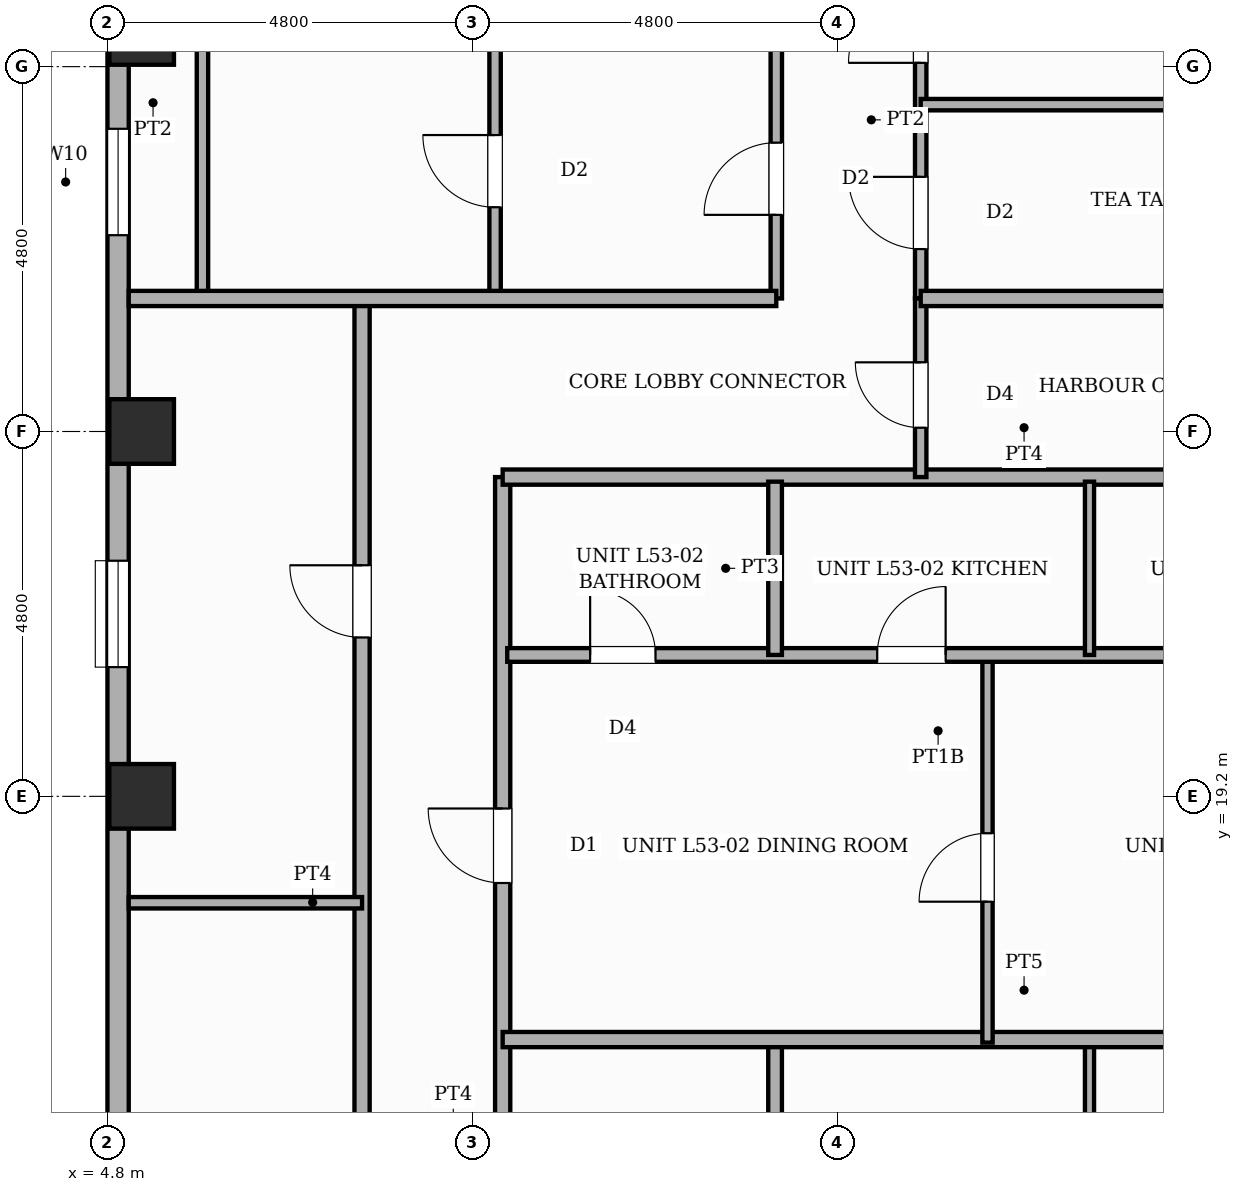
"""IFC4 building model, lengths in metres.
Left out: names, types, materials, properties, quantities, classifications, styles, units other than length and angle.
Written with IfcOpenShell. Run it as: python <this file> out.ifc"""

import sys

from ifc_helpers import new_model, si_unit, direction, frame, frame_2d, origin, origin_2d, place, context, subcontext, project, spatial, rectangle, extrude, element, fill, save


model = new_model("IFC4")
c1 = context("Model", 3, precision=1e-05, world=origin(), true_north=direction((0.0, 1.0)))
c2 = subcontext(c1, "Body", "Model", "MODEL_VIEW")
j1 = project(units=[si_unit("LENGTHUNIT", "METRE"), si_unit("PLANEANGLEUNIT", "RADIAN")], contexts=[c1])
p1 = place(None, origin())
s1 = spatial("IfcSite", under=j1, at=p1, CompositionType="ELEMENT")
p2 = place(p1, origin())
s2 = spatial("IfcBuilding", under=s1, at=p2, CompositionType="ELEMENT")
p3 = place(p2, frame((0.0, 0.0, 203.8)))
s3 = spatial("IfcBuildingStorey", under=s2, at=p3, CompositionType="ELEMENT", Elevation=203.8)
for number, where, z_axis, x_axis in (
    (1, (5.25, 19.2, 0.0), (0.0, 0.0, 1.0), (1.0, 0.0, 0.0)),
    (2, (5.25, 24.0, 0.0), (0.0, 0.0, 1.0), (1.0, 0.0, 0.0)),
    (3, (5.25, 29.25, 0.0), (0.0, 0.0, 1.0), (1.0, 0.0, 0.0)),
):
    element("IfcColumn", number, at=place(p3, frame(where, z_axis=z_axis, x_axis=x_axis)), inside=s3, PredefinedType="COLUMN", context=c2, shape_type="SweptSolid", body=[
        extrude(rectangle(XDim=0.85, YDim=0.85, at=origin_2d()), origin(), (0.0, 0.0, 1.0), 3.6),
    ])
p4 = place(p3, frame((4.94, 12.0, 0.0), z_axis=(0.0, 0.0, 1.0), x_axis=(0.0, 1.0, 0.0)))
e4 = element("IfcWall", 4, at=p4, inside=s3, PredefinedType="STANDARD", context=c2, shape_type="SweptSolid", body=[
    extrude(rectangle(XDim=33.6, YDim=0.28, at=frame_2d((16.8, 0.0))), origin(), (0.0, 0.0, 1.0), 2.66),
])
p5 = place(p4, frame((14.583, 0.0, 0.65)))
e5 = element("IfcOpeningElement", 5, at=p5, cuts=e4, PredefinedType="OPENING", context=c2, shape_type="SweptSolid", body=[
    extrude(rectangle(XDim=1.4, YDim=1.1, at=frame_2d((0.7, 0.55))), frame((0.0, 0.15, 0.0), z_axis=(0.0, -1.0, 0.0), x_axis=(1.0, 0.0, 0.0)), (0.0, 0.0, 1.0), 0.3),
])
p6 = place(p4, frame((0.308, 0.0, 0.65)))
e6 = element("IfcOpeningElement", 6, at=p6, cuts=e4, PredefinedType="OPENING", context=c2, shape_type="SweptSolid", body=[
    extrude(rectangle(XDim=1.4, YDim=1.1, at=frame_2d((0.7, 0.55))), frame((0.0, 0.15, 0.0), z_axis=(0.0, -1.0, 0.0), x_axis=(1.0, 0.0, 0.0)), (0.0, 0.0, 1.0), 0.3),
])
p7 = place(p4, frame((8.9, 0.0, 0.65)))
e7 = element("IfcOpeningElement", 7, at=p7, cuts=e4, PredefinedType="OPENING", context=c2, shape_type="SweptSolid", body=[
    extrude(rectangle(XDim=1.4, YDim=1.1, at=frame_2d((0.7, 0.55))), frame((0.0, 0.15, 0.0), z_axis=(0.0, -1.0, 0.0), x_axis=(1.0, 0.0, 0.0)), (0.0, 0.0, 1.0), 0.3),
])
p8 = place(p3, frame((13.6, 25.75, 0.0), z_axis=(0.0, 0.0, 1.0), x_axis=(0.0, 1.0, 0.0)))
e8 = element("IfcWall", 8, at=p8, inside=s3, PredefinedType="PARTITIONING", context=c2, shape_type="SweptSolid", body=[
    extrude(rectangle(XDim=5.15, YDim=0.15, at=frame_2d((2.575, 0.0))), origin(), (0.0, 0.0, 1.0), 3.38),
])
p9 = place(p8, frame((1.1, 0.0, 0.0)))
e9 = element("IfcOpeningElement", 9, at=p9, cuts=e8, PredefinedType="OPENING", context=c2, shape_type="SweptSolid", body=[
    extrude(rectangle(XDim=0.95, YDim=2.15, at=frame_2d((0.475, 1.075))), frame((0.0, 0.085, 0.0), z_axis=(0.0, -1.0, 0.0), x_axis=(1.0, 0.0, 0.0)), (0.0, 0.0, 1.0), 0.17),
])
p10 = place(p3, frame((15.5, 25.75, 0.0), z_axis=(0.0, 0.0, 1.0), x_axis=(0.0, 1.0, 0.0)))
e10 = element("IfcWall", 10, at=p10, inside=s3, PredefinedType="PARTITIONING", context=c2, shape_type="SweptSolid", body=[
    extrude(rectangle(XDim=5.15, YDim=0.15, at=frame_2d((2.575, 0.0))), origin(), (0.0, 0.0, 1.0), 3.38),
])
p11 = place(p10, frame((0.65, 0.0, 0.0)))
e11 = element("IfcOpeningElement", 11, at=p11, cuts=e10, PredefinedType="OPENING", context=c2, shape_type="SweptSolid", body=[
    extrude(rectangle(XDim=0.95, YDim=2.15, at=frame_2d((0.475, 1.075))), frame((0.0, 0.085, 0.0), z_axis=(0.0, -1.0, 0.0), x_axis=(1.0, 0.0, 0.0)), (0.0, 0.0, 1.0), 0.17),
])
p12 = place(p10, frame((3.1, 0.0, 0.0)))
e12 = element("IfcOpeningElement", 12, at=p12, cuts=e10, PredefinedType="OPENING", context=c2, shape_type="SweptSolid", body=[
    extrude(rectangle(XDim=0.95, YDim=2.15, at=frame_2d((0.475, 1.075))), frame((0.0, 0.085, 0.0), z_axis=(0.0, -1.0, 0.0), x_axis=(1.0, 0.0, 0.0)), (0.0, 0.0, 1.0), 0.17),
])
p13 = place(p3, frame((6.05, 25.75, 0.0), z_axis=(0.0, 0.0, 1.0), x_axis=(0.0, 1.0, 0.0)))
e13 = element("IfcWall", 13, at=p13, inside=s3, PredefinedType="PARTITIONING", context=c2, shape_type="SweptSolid", body=[
    extrude(rectangle(XDim=5.15, YDim=0.15, at=frame_2d((2.575, 0.0))), origin(), (0.0, 0.0, 1.0), 3.38),
])
p14 = place(p3, frame((9.9, 25.75, 0.0), z_axis=(0.0, 0.0, 1.0), x_axis=(0.0, 1.0, 0.0)))
e14 = element("IfcWall", 14, at=p14, inside=s3, PredefinedType="PARTITIONING", context=c2, shape_type="SweptSolid", body=[
    extrude(rectangle(XDim=5.15, YDim=0.15, at=frame_2d((2.575, 0.0))), origin(), (0.0, 0.0, 1.0), 3.38),
])
p15 = place(p14, frame((1.2, 0.0, 0.0)))
e15 = element("IfcOpeningElement", 15, at=p15, cuts=e14, PredefinedType="OPENING", context=c2, shape_type="SweptSolid", body=[
    extrude(rectangle(XDim=0.95, YDim=2.15, at=frame_2d((0.475, 1.075))), frame((0.0, 0.085, 0.0), z_axis=(0.0, -1.0, 0.0), x_axis=(1.0, 0.0, 0.0)), (0.0, 0.0, 1.0), 0.17),
])
p16 = place(p3, frame((15.5, 28.3, 0.0), z_axis=(0.0, 0.0, 1.0), x_axis=(1.0, 0.0, 0.0)))
e16 = element("IfcWall", 16, at=p16, inside=s3, PredefinedType="PARTITIONING", context=c2, shape_type="SweptSolid", body=[
    extrude(rectangle(XDim=7.25, YDim=0.15, at=frame_2d((3.625, 0.0))), origin(), (0.0, 0.0, 1.0), 3.38),
])
p17 = place(p3, frame((8.15, 9.88, 0.0), z_axis=(0.0, 0.0, 1.0), x_axis=(0.0, 1.0, 0.0)))
e17 = element("IfcWall", 17, at=p17, inside=s3, PredefinedType="PARTITIONING", context=c2, shape_type="SweptSolid", body=[
    extrude(rectangle(XDim=15.87, YDim=0.2, at=frame_2d((7.935, 0.0))), origin(), (0.0, 0.0, 1.0), 3.38),
])
p18 = place(p17, frame((3.49, 0.0, 0.0)))
e18 = element("IfcOpeningElement", 18, at=p18, cuts=e17, PredefinedType="OPENING", context=c2, shape_type="SweptSolid", body=[
    extrude(rectangle(XDim=0.95, YDim=2.15, at=frame_2d((0.475, 1.075))), frame((0.0, 0.11, 0.0), z_axis=(0.0, -1.0, 0.0), x_axis=(1.0, 0.0, 0.0)), (0.0, 0.0, 1.0), 0.22),
])
p19 = place(p17, frame((11.41, 0.0, 0.0)))
e19 = element("IfcOpeningElement", 19, at=p19, cuts=e17, PredefinedType="OPENING", context=c2, shape_type="SweptSolid", body=[
    extrude(rectangle(XDim=0.95, YDim=2.15, at=frame_2d((0.475, 1.075))), frame((0.0, 0.11, 0.0), z_axis=(0.0, -1.0, 0.0), x_axis=(1.0, 0.0, 0.0)), (0.0, 0.0, 1.0), 0.22),
])
p20 = place(p3, frame((10.0, 9.88, 0.0), z_axis=(0.0, 0.0, 1.0), x_axis=(0.0, 1.0, 0.0)))
e20 = element("IfcWall", 20, at=p20, inside=s3, PredefinedType="PARTITIONING", context=c2, shape_type="SweptSolid", body=[
    extrude(rectangle(XDim=13.52, YDim=0.2, at=frame_2d((6.76, 0.0))), origin(), (0.0, 0.0, 1.0), 3.38),
])
p21 = place(p20, frame((0.894, 0.0, 0.0)))
e21 = element("IfcOpeningElement", 21, at=p21, cuts=e20, PredefinedType="OPENING", context=c2, shape_type="SweptSolid", body=[
    extrude(rectangle(XDim=0.98, YDim=2.18, at=frame_2d((0.49, 1.09))), frame((0.0, 0.11, 0.0), z_axis=(0.0, -1.0, 0.0), x_axis=(1.0, 0.0, 0.0)), (0.0, 0.0, 1.0), 0.22),
])
p22 = place(p20, frame((8.18, 0.0, 0.0)))
e22 = element("IfcOpeningElement", 22, at=p22, cuts=e20, PredefinedType="OPENING", context=c2, shape_type="SweptSolid", body=[
    extrude(rectangle(XDim=0.98, YDim=2.18, at=frame_2d((0.49, 1.09))), frame((0.0, 0.11, 0.0), z_axis=(0.0, -1.0, 0.0), x_axis=(1.0, 0.0, 0.0)), (0.0, 0.0, 1.0), 0.22),
])
p23 = place(p3, frame((10.0, 23.4, 0.0), z_axis=(0.0, 0.0, 1.0), x_axis=(1.0, 0.0, 0.0)))
e23 = element("IfcWall", 23, at=p23, inside=s3, PredefinedType="PARTITIONING", context=c2, shape_type="SweptSolid", body=[
    extrude(rectangle(XDim=13.72, YDim=0.2, at=frame_2d((6.86, 0.0))), origin(), (0.0, 0.0, 1.0), 3.38),
])
p24 = place(p3, frame((5.08, 25.75, 0.0), z_axis=(0.0, 0.0, 1.0), x_axis=(1.0, 0.0, 0.0)))
e24 = element("IfcWall", 24, at=p24, inside=s3, PredefinedType="PARTITIONING", context=c2, shape_type="SweptSolid", body=[
    extrude(rectangle(XDim=8.52, YDim=0.2, at=frame_2d((4.26, 0.0))), origin(), (0.0, 0.0, 1.0), 3.38),
])
p25 = place(p3, frame((15.5, 23.4, 0.0), z_axis=(0.0, 0.0, 1.0), x_axis=(0.0, 1.0, 0.0)))
e25 = element("IfcWall", 25, at=p25, inside=s3, PredefinedType="PARTITIONING", context=c2, shape_type="SweptSolid", body=[
    extrude(rectangle(XDim=2.35, YDim=0.15, at=frame_2d((1.175, 0.0))), origin(), (0.0, 0.0, 1.0), 3.38),
])
p26 = place(p25, frame((0.65, 0.0, 0.0)))
e26 = element("IfcOpeningElement", 26, at=p26, cuts=e25, PredefinedType="OPENING", context=c2, shape_type="SweptSolid", body=[
    extrude(rectangle(XDim=0.86, YDim=2.1, at=frame_2d((0.43, 1.05))), frame((0.0, 0.085, 0.0), z_axis=(0.0, -1.0, 0.0), x_axis=(1.0, 0.0, 0.0)), (0.0, 0.0, 1.0), 0.17),
])
p27 = place(p3, frame((15.5, 25.75, 0.0), z_axis=(0.0, 0.0, 1.0), x_axis=(1.0, 0.0, 0.0)))
e27 = element("IfcWall", 27, at=p27, inside=s3, PredefinedType="PARTITIONING", context=c2, shape_type="SweptSolid", body=[
    extrude(rectangle(XDim=8.22, YDim=0.2, at=frame_2d((4.11, 0.0))), origin(), (0.0, 0.0, 1.0), 3.38),
])
p28 = place(p3, frame((5.08, 17.8, 0.0), z_axis=(0.0, 0.0, 1.0), x_axis=(1.0, 0.0, 0.0)))
e28 = element("IfcWall", 28, at=p28, inside=s3, PredefinedType="PARTITIONING", context=c2, shape_type="SweptSolid", body=[
    extrude(rectangle(XDim=3.07, YDim=0.15, at=frame_2d((1.535, 0.0))), origin(), (0.0, 0.0, 1.0), 3.38),
])
p29 = place(p3, frame((13.584, 12.348, 0.0), z_axis=(0.0, 0.0, 1.0), x_axis=(0.0, 1.0, 0.0)))
e29 = element("IfcWall", 29, at=p29, inside=s3, PredefinedType="PLUMBINGWALL", context=c2, shape_type="SweptSolid", body=[
    extrude(rectangle(XDim=3.692, YDim=0.18, at=frame_2d((1.846, 0.0))), origin(), (0.0, 0.0, 1.0), 3.38),
])
p30 = place(p3, frame((17.721, 12.348, 0.0), z_axis=(0.0, 0.0, 1.0), x_axis=(0.0, 1.0, 0.0)))
e30 = element("IfcWall", 30, at=p30, inside=s3, PredefinedType="PARTITIONING", context=c2, shape_type="SweptSolid", body=[
    extrude(rectangle(XDim=3.692, YDim=0.12, at=frame_2d((1.846, 0.0))), origin(), (0.0, 0.0, 1.0), 3.38),
])
p31 = place(p3, frame((10.0, 16.0, 0.0), z_axis=(0.0, 0.0, 1.0), x_axis=(1.0, 0.0, 0.0)))
e31 = element("IfcWall", 31, at=p31, inside=s3, PredefinedType="SOLIDWALL", context=c2, shape_type="SweptSolid", body=[
    extrude(rectangle(XDim=13.72, YDim=0.2, at=frame_2d((6.86, 0.0))), origin(), (0.0, 0.0, 1.0), 3.38),
])
p32 = place(p3, frame((16.379, 15.96, 0.0), z_axis=(0.0, 0.0, 1.0), x_axis=(0.0, 1.0, 0.0)))
e32 = element("IfcWall", 32, at=p32, inside=s3, PredefinedType="PARTITIONING", context=c2, shape_type="SweptSolid", body=[
    extrude(rectangle(XDim=5.1, YDim=0.135, at=frame_2d((2.55, 0.0))), origin(), (0.0, 0.0, 1.0), 3.38),
])
p33 = place(p32, frame((1.854, 0.0, 0.0)))
e33 = element("IfcOpeningElement", 33, at=p33, cuts=e32, PredefinedType="OPENING", context=c2, shape_type="SweptSolid", body=[
    extrude(rectangle(XDim=0.9, YDim=2.15, at=frame_2d((0.45, 1.075))), frame((0.0, 0.078, 0.0), z_axis=(0.0, -1.0, 0.0), x_axis=(1.0, 0.0, 0.0)), (0.0, 0.0, 1.0), 0.155),
])
p34 = place(p3, frame((10.06, 21.06, 0.0), z_axis=(0.0, 0.0, 1.0), x_axis=(1.0, 0.0, 0.0)))
e34 = element("IfcWall", 34, at=p34, inside=s3, PredefinedType="PLUMBINGWALL", context=c2, shape_type="SweptSolid", body=[
    extrude(rectangle(XDim=13.66, YDim=0.18, at=frame_2d((6.83, 0.0))), origin(), (0.0, 0.0, 1.0), 3.38),
])
p35 = place(p34, frame((1.091, 0.0, 0.0)))
e35 = element("IfcOpeningElement", 35, at=p35, cuts=e34, PredefinedType="OPENING", context=c2, shape_type="SweptSolid", body=[
    extrude(rectangle(XDim=0.86, YDim=2.1, at=frame_2d((0.43, 1.05))), frame((0.0, 0.1, 0.0), z_axis=(0.0, -1.0, 0.0), x_axis=(1.0, 0.0, 0.0)), (0.0, 0.0, 1.0), 0.2),
])
p36 = place(p34, frame((4.868, 0.0, 0.0)))
e36 = element("IfcOpeningElement", 36, at=p36, cuts=e34, PredefinedType="OPENING", context=c2, shape_type="SweptSolid", body=[
    extrude(rectangle(XDim=0.9, YDim=2.15, at=frame_2d((0.45, 1.075))), frame((0.0, 0.1, 0.0), z_axis=(0.0, -1.0, 0.0), x_axis=(1.0, 0.0, 0.0)), (0.0, 0.0, 1.0), 0.2),
])
p37 = place(p34, frame((9.897, 0.0, 0.0)))
e37 = element("IfcOpeningElement", 37, at=p37, cuts=e34, PredefinedType="OPENING", context=c2, shape_type="SweptSolid", body=[
    extrude(rectangle(XDim=0.9, YDim=2.15, at=frame_2d((0.45, 1.075))), frame((0.0, 0.1, 0.0), z_axis=(0.0, -1.0, 0.0), x_axis=(1.0, 0.0, 0.0)), (0.0, 0.0, 1.0), 0.2),
])
p38 = place(p3, frame((13.584, 21.06, 0.0), z_axis=(0.0, 0.0, 1.0), x_axis=(0.0, 1.0, 0.0)))
e38 = element("IfcWall", 38, at=p38, inside=s3, PredefinedType="PLUMBINGWALL", context=c2, shape_type="SweptSolid", body=[
    extrude(rectangle(XDim=2.28, YDim=0.18, at=frame_2d((1.14, 0.0))), origin(), (0.0, 0.0, 1.0), 3.38),
])
p39 = place(p3, frame((17.721, 21.06, 0.0), z_axis=(0.0, 0.0, 1.0), x_axis=(0.0, 1.0, 0.0)))
e39 = element("IfcWall", 39, at=p39, inside=s3, PredefinedType="PARTITIONING", context=c2, shape_type="SweptSolid", body=[
    extrude(rectangle(XDim=2.28, YDim=0.12, at=frame_2d((1.14, 0.0))), origin(), (0.0, 0.0, 1.0), 3.38),
])
p40 = place(p5, origin())
e40 = element("IfcWindow", 40, at=p40, inside=s3, PartitioningType="SINGLE_PANEL", PredefinedType="WINDOW", context=c2, shape_type="SweptSolid", body=[
    extrude(rectangle(XDim=1.4, YDim=1.1, at=frame_2d((0.7, 0.55))), frame((0.0, 0.03, 0.0), z_axis=(0.0, -1.0, 0.0), x_axis=(1.0, 0.0, 0.0)), (0.0, 0.0, 1.0), 0.06),
])
fill(e5, e40)
p41 = place(p7, origin())
e41 = element("IfcWindow", 41, at=p41, inside=s3, PartitioningType="SINGLE_PANEL", PredefinedType="WINDOW", context=c2, shape_type="SweptSolid", body=[
    extrude(rectangle(XDim=1.4, YDim=1.1, at=frame_2d((0.7, 0.55))), frame((0.0, 0.03, 0.0), z_axis=(0.0, -1.0, 0.0), x_axis=(1.0, 0.0, 0.0)), (0.0, 0.0, 1.0), 0.06),
])
fill(e7, e41)
p42 = place(p9, origin())
e42 = element("IfcDoor", 42, at=p42, inside=s3, OperationType="SINGLE_SWING_LEFT", PredefinedType="DOOR", context=c2, shape_type="SweptSolid", body=[
    extrude(rectangle(XDim=0.95, YDim=2.15, at=frame_2d((0.475, 1.075))), frame((0.0, 0.025, 0.0), z_axis=(0.0, -1.0, 0.0), x_axis=(1.0, 0.0, 0.0)), (0.0, 0.0, 1.0), 0.05),
])
fill(e9, e42)
p43 = place(p15, origin())
e43 = element("IfcDoor", 43, at=p43, inside=s3, OperationType="SINGLE_SWING_RIGHT", PredefinedType="DOOR", context=c2, shape_type="SweptSolid", body=[
    extrude(rectangle(XDim=0.95, YDim=2.15, at=frame_2d((0.475, 1.075))), frame((0.0, 0.025, 0.0), z_axis=(0.0, -1.0, 0.0), x_axis=(1.0, 0.0, 0.0)), (0.0, 0.0, 1.0), 0.05),
])
fill(e15, e43)
p44 = place(p11, origin())
e44 = element("IfcDoor", 44, at=p44, inside=s3, OperationType="SINGLE_SWING_RIGHT", PredefinedType="DOOR", context=c2, shape_type="SweptSolid", body=[
    extrude(rectangle(XDim=0.95, YDim=2.15, at=frame_2d((0.475, 1.075))), frame((0.0, 0.025, 0.0), z_axis=(0.0, -1.0, 0.0), x_axis=(1.0, 0.0, 0.0)), (0.0, 0.0, 1.0), 0.05),
])
fill(e11, e44)
p45 = place(p12, origin())
e45 = element("IfcDoor", 45, at=p45, inside=s3, OperationType="SINGLE_SWING_LEFT", PredefinedType="DOOR", context=c2, shape_type="SweptSolid", body=[
    extrude(rectangle(XDim=0.95, YDim=2.15, at=frame_2d((0.475, 1.075))), frame((0.0, 0.025, 0.0), z_axis=(0.0, -1.0, 0.0), x_axis=(1.0, 0.0, 0.0)), (0.0, 0.0, 1.0), 0.05),
])
fill(e12, e45)
p46 = place(p26, origin())
e46 = element("IfcDoor", 46, at=p46, inside=s3, OperationType="SINGLE_SWING_RIGHT", PredefinedType="DOOR", context=c2, shape_type="SweptSolid", body=[
    extrude(rectangle(XDim=0.86, YDim=2.1, at=frame_2d((0.43, 1.05))), frame((0.0, 0.025, 0.0), z_axis=(0.0, -1.0, 0.0), x_axis=(1.0, 0.0, 0.0)), (0.0, 0.0, 1.0), 0.05),
])
fill(e26, e46)
p47 = place(p19, origin())
e47 = element("IfcDoor", 47, at=p47, inside=s3, OperationType="SINGLE_SWING_RIGHT", PredefinedType="DOOR", context=c2, shape_type="SweptSolid", body=[
    extrude(rectangle(XDim=0.95, YDim=2.15, at=frame_2d((0.475, 1.075))), frame((0.0, 0.025, 0.0), z_axis=(0.0, -1.0, 0.0), x_axis=(1.0, 0.0, 0.0)), (0.0, 0.0, 1.0), 0.05),
])
fill(e19, e47)
p48 = place(p22, origin())
e48 = element("IfcDoor", 48, at=p48, inside=s3, OperationType="SINGLE_SWING_RIGHT", PredefinedType="DOOR", context=c2, shape_type="SweptSolid", body=[
    extrude(rectangle(XDim=0.98, YDim=2.18, at=frame_2d((0.49, 1.09))), frame((0.0, 0.025, 0.0), z_axis=(0.0, -1.0, 0.0), x_axis=(1.0, 0.0, 0.0)), (0.0, 0.0, 1.0), 0.05),
])
fill(e22, e48)
p49 = place(p33, origin())
e49 = element("IfcDoor", 49, at=p49, inside=s3, OperationType="SINGLE_SWING_LEFT", PredefinedType="DOOR", context=c2, shape_type="SweptSolid", body=[
    extrude(rectangle(XDim=0.9, YDim=2.15, at=frame_2d((0.45, 1.075))), frame((0.0, 0.025, 0.0), z_axis=(0.0, -1.0, 0.0), x_axis=(1.0, 0.0, 0.0)), (0.0, 0.0, 1.0), 0.05),
])
fill(e33, e49)
p50 = place(p35, origin())
e50 = element("IfcDoor", 50, at=p50, inside=s3, OperationType="SINGLE_SWING_LEFT", PredefinedType="DOOR", context=c2, shape_type="SweptSolid", body=[
    extrude(rectangle(XDim=0.86, YDim=2.1, at=frame_2d((0.43, 1.05))), frame((0.0, 0.025, 0.0), z_axis=(0.0, -1.0, 0.0), x_axis=(1.0, 0.0, 0.0)), (0.0, 0.0, 1.0), 0.05),
])
fill(e35, e50)
p51 = place(p36, origin())
e51 = element("IfcDoor", 51, at=p51, inside=s3, OperationType="SINGLE_SWING_RIGHT", PredefinedType="DOOR", context=c2, shape_type="SweptSolid", body=[
    extrude(rectangle(XDim=0.9, YDim=2.15, at=frame_2d((0.45, 1.075))), frame((0.0, 0.025, 0.0), z_axis=(0.0, -1.0, 0.0), x_axis=(1.0, 0.0, 0.0)), (0.0, 0.0, 1.0), 0.05),
])
fill(e36, e51)
save(model, sys.argv[1])
